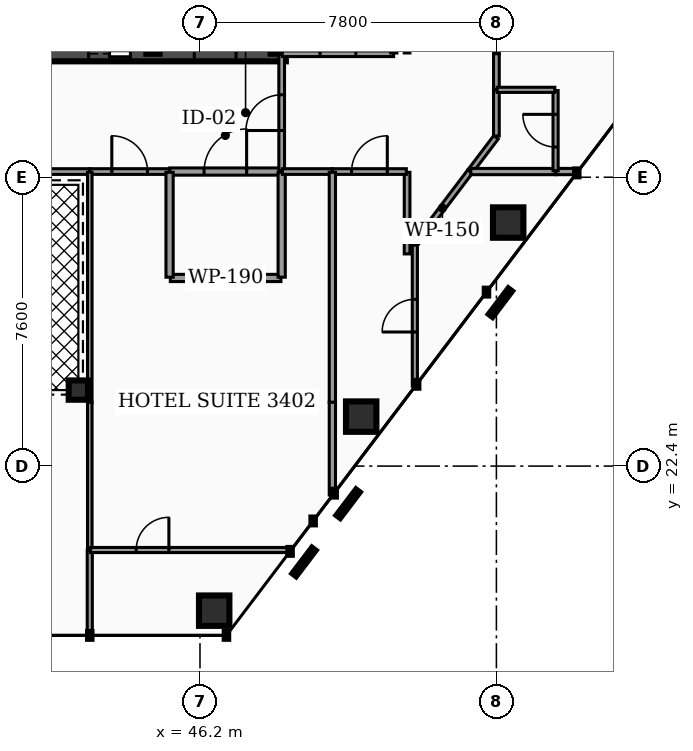
"""IFC4 building model, lengths in metres.
Left out: names, types, materials, properties, quantities, classifications, styles, units other than length and angle.
Written with IfcOpenShell. Run it as: python <this file> out.ifc"""

import sys

from ifc_helpers import new_model, si_unit, direction, frame, frame_2d, origin, origin_2d, place, context, subcontext, project, spatial, rectangle, hollow_rectangle, hollow_circle, extrude, element, fill, save


model = new_model("IFC4")
c1 = context("Model", 3, precision=1e-05, world=origin(), true_north=direction((0.0, 1.0)))
c2 = subcontext(c1, "Body", "Model", "MODEL_VIEW")
j1 = project(units=[si_unit("LENGTHUNIT", "METRE"), si_unit("PLANEANGLEUNIT", "RADIAN")], contexts=[c1])
p1 = place(None, origin())
s1 = spatial("IfcSite", under=j1, at=p1, CompositionType="ELEMENT")
p2 = place(p1, origin())
s2 = spatial("IfcBuilding", under=s1, at=p2, CompositionType="ELEMENT")
p3 = place(p2, frame((0.0, 0.0, 142.12)))
s3 = spatial("IfcBuildingStorey", under=s2, at=p3, CompositionType="ELEMENT", Elevation=142.12)
p4 = place(p3, frame((28.4, 33.25, 0.0), z_axis=(0.0, 0.0, 1.0), x_axis=(1.0, 0.0, 0.0)))
e1 = element("IfcWall", 1, at=p4, inside=s3, PredefinedType="SHEAR", context=c2, shape_type="SweptSolid", body=[
    extrude(rectangle(XDim=20.06, YDim=0.4, at=frame_2d((10.03, 0.0))), origin(), (0.0, 0.0, 1.0), 3.5),
])
p5 = place(p4, frame((4.03, 0.0, 0.0)))
e2 = element("IfcOpeningElement", 2, at=p5, cuts=e1, PredefinedType="OPENING", context=c2, shape_type="SweptSolid", body=[
    extrude(rectangle(XDim=1.1, YDim=2.15, at=frame_2d((0.55, 1.075))), frame((0.0, 0.21, 0.0), z_axis=(0.0, -1.0, 0.0), x_axis=(1.0, 0.0, 0.0)), (0.0, 0.0, 1.0), 0.42),
])
p6 = place(p4, frame((14.87, 0.0, 0.0)))
e3 = element("IfcOpeningElement", 3, at=p6, cuts=e1, PredefinedType="OPENING", context=c2, shape_type="SweptSolid", body=[
    extrude(rectangle(XDim=1.1, YDim=2.15, at=frame_2d((0.55, 1.075))), frame((0.0, 0.21, 0.0), z_axis=(0.0, -1.0, 0.0), x_axis=(1.0, 0.0, 0.0)), (0.0, 0.0, 1.0), 0.42),
])
p7 = place(p4, frame((5.95, 0.0, 0.0)))
e4 = element("IfcOpeningElement", 4, at=p7, cuts=e1, PredefinedType="OPENING", context=c2, shape_type="SweptSolid", body=[
    extrude(rectangle(XDim=1.0, YDim=2.1, at=frame_2d((0.5, 1.05))), frame((0.0, 0.21, 0.0), z_axis=(0.0, -1.0, 0.0), x_axis=(1.0, 0.0, 0.0)), (0.0, 0.0, 1.0), 0.42),
])
p8 = place(p4, frame((7.65, 0.0, 0.0)))
e5 = element("IfcOpeningElement", 5, at=p8, cuts=e1, PredefinedType="OPENING", context=c2, shape_type="SweptSolid", body=[
    extrude(rectangle(XDim=1.0, YDim=2.1, at=frame_2d((0.5, 1.05))), frame((0.0, 0.21, 0.0), z_axis=(0.0, -1.0, 0.0), x_axis=(1.0, 0.0, 0.0)), (0.0, 0.0, 1.0), 0.42),
])
p9 = place(p4, frame((1.31, 0.0, 0.0)))
e6 = element("IfcOpeningElement", 6, at=p9, cuts=e1, PredefinedType="OPENING", context=c2, shape_type="SweptSolid", body=[
    extrude(rectangle(XDim=1.1, YDim=2.2, at=frame_2d((0.55, 1.1))), frame((0.0, 0.21, 0.0), z_axis=(0.0, -1.0, 0.0), x_axis=(1.0, 0.0, 0.0)), (0.0, 0.0, 1.0), 0.42),
])
p10 = place(p4, frame((9.44, 0.0, 0.0)))
e7 = element("IfcOpeningElement", 7, at=p10, cuts=e1, PredefinedType="OPENING", context=c2, shape_type="SweptSolid", body=[
    extrude(rectangle(XDim=1.12, YDim=2.05, at=frame_2d((0.56, 1.025))), frame((0.0, 0.21, 0.0), z_axis=(0.0, -1.0, 0.0), x_axis=(1.0, 0.0, 0.0)), (0.0, 0.0, 1.0), 0.42),
])
p11 = place(p4, frame((17.65, 0.0, 0.0)))
e8 = element("IfcOpeningElement", 8, at=p11, cuts=e1, PredefinedType="OPENING", context=c2, shape_type="SweptSolid", body=[
    extrude(rectangle(XDim=1.1, YDim=2.2, at=frame_2d((0.55, 1.1))), frame((0.0, 0.21, 0.0), z_axis=(0.0, -1.0, 0.0), x_axis=(1.0, 0.0, 0.0)), (0.0, 0.0, 1.0), 0.42),
])
p12 = place(p3, frame((44.965, 33.25, 0.0), z_axis=(0.0, 0.0, 1.0), x_axis=(0.0, 1.0, 0.0)))
e9 = element("IfcWall", 9, at=p12, inside=s3, PredefinedType="SHEAR", context=c2, shape_type="SweptSolid", body=[
    extrude(rectangle(XDim=10.2, YDim=0.35, at=frame_2d((5.1, 0.0))), origin(), (0.0, 0.0, 1.0), 3.5),
])
p13 = place(p3, frame((48.26, 33.25, 0.0), z_axis=(0.0, 0.0, 1.0), x_axis=(0.0, 1.0, 0.0)))
e10 = element("IfcWall", 10, at=p13, inside=s3, PredefinedType="SHEAR", context=c2, shape_type="SweptSolid", body=[
    extrude(rectangle(XDim=10.2, YDim=0.4, at=frame_2d((5.1, 0.0))), origin(), (0.0, 0.0, 1.0), 3.5),
])
p14 = place(p3, frame((46.574, 18.596, 0.0), z_axis=(-0.089987082643, -0.032495335399, 0.995412667257), x_axis=(0.339644463778, -0.940553899692, 0.0)))
e11 = element("IfcColumn", 11, at=p14, inside=s3, PredefinedType="COLUMN", context=c2, shape_type="SweptSolid", body=[
    extrude(hollow_rectangle(XDim=0.8, YDim=0.8, WallThickness=0.04, at=origin_2d()), origin(), (0.0, 0.0, 1.0), 3.516),
])
p15 = place(p3, frame((50.442, 23.702, 0.0), z_axis=(-0.063140746521, 0.003132672099, 0.997999715678), x_axis=(-0.049553160901, -0.998771487501, 0.0)))
e12 = element("IfcColumn", 12, at=p15, inside=s3, PredefinedType="COLUMN", context=c2, shape_type="SweptSolid", body=[
    extrude(hollow_rectangle(XDim=0.8, YDim=0.8, WallThickness=0.04, at=origin_2d()), origin(), (0.0, 0.0, 1.0), 3.507),
])
p16 = place(p3, frame((54.31, 28.808, 0.0), z_axis=(-0.036081962312, 0.038868214228, 0.998592686694), x_axis=(-0.732887043216, -0.68035033761, 0.0)))
e13 = element("IfcColumn", 13, at=p16, inside=s3, PredefinedType="COLUMN", context=c2, shape_type="SweptSolid", body=[
    extrude(hollow_rectangle(XDim=0.8, YDim=0.8, WallThickness=0.04, at=origin_2d()), origin(), (0.0, 0.0, 1.0), 3.505),
])
p17 = place(p3, frame((43.0, 24.4, 0.0), z_axis=(0.0, 0.0, 1.0), x_axis=(1.0, 0.0, 0.0)))
e14 = element("IfcColumn", 14, at=p17, inside=s3, PredefinedType="COLUMN", context=c2, shape_type="SweptSolid", body=[
    extrude(hollow_circle(Radius=0.254, WallThickness=0.02, at=origin_2d()), origin(), (0.0, 0.0, 1.0), 3.5),
])
p18 = place(p3, frame((45.405, 30.15, 0.0), z_axis=(0.0, 0.0, 1.0), x_axis=(1.0, 0.0, 0.0)))
e15 = element("IfcWall", 15, at=p18, inside=s3, PredefinedType="PARTITIONING", context=c2, shape_type="SweptSolid", body=[
    extrude(rectangle(XDim=2.925, YDim=0.19, at=frame_2d((1.462, 0.0))), origin(), (0.0, 0.0, 1.0), 2.457),
])
p19 = place(p18, frame((0.903, 0.0, 0.0)))
e16 = element("IfcOpeningElement", 16, at=p19, cuts=e15, PredefinedType="OPENING", context=c2, shape_type="SweptSolid", body=[
    extrude(rectangle(XDim=1.12, YDim=2.05, at=frame_2d((0.56, 1.025))), frame((0.0, 0.105, 0.0), z_axis=(0.0, -1.0, 0.0), x_axis=(1.0, 0.0, 0.0)), (0.0, 0.0, 1.0), 0.21),
])
p20 = place(p3, frame((48.35, 30.17, 0.0), z_axis=(0.0, 0.0, 1.0), x_axis=(0.0, 1.0, 0.0)))
e17 = element("IfcWall", 17, at=p20, inside=s3, PredefinedType="PARTITIONING", context=c2, shape_type="SweptSolid", body=[
    extrude(rectangle(XDim=3.06, YDim=0.15, at=frame_2d((1.53, 0.0))), origin(), (0.0, 0.0, 1.0), 2.457),
])
p21 = place(p20, frame((1.06, 0.0, 0.0)))
e18 = element("IfcOpeningElement", 18, at=p21, cuts=e17, PredefinedType="OPENING", context=c2, shape_type="SweptSolid", body=[
    extrude(rectangle(XDim=0.94, YDim=2.05, at=frame_2d((0.47, 1.025))), frame((0.0, 0.085, 0.0), z_axis=(0.0, -1.0, 0.0), x_axis=(1.0, 0.0, 0.0)), (0.0, 0.0, 1.0), 0.17),
])
p22 = place(p3, frame((35.385, 30.15, 0.0), z_axis=(0.0, 0.0, 1.0), x_axis=(1.0, 0.0, 0.0)))
e19 = element("IfcWall", 19, at=p22, inside=s3, PredefinedType="PARTITIONING", context=c2, shape_type="SweptSolid", body=[
    extrude(rectangle(XDim=7.91, YDim=0.15, at=frame_2d((3.955, 0.0))), origin(), (0.0, 0.0, 1.0), 2.457),
])
p23 = place(p22, frame((0.25, 0.0, 0.0)))
e20 = element("IfcOpeningElement", 20, at=p23, cuts=e19, PredefinedType="OPENING", context=c2, shape_type="SweptSolid", body=[
    extrude(rectangle(XDim=0.88, YDim=2.05, at=frame_2d((0.44, 1.025))), frame((0.0, 0.085, 0.0), z_axis=(0.0, -1.0, 0.0), x_axis=(1.0, 0.0, 0.0)), (0.0, 0.0, 1.0), 0.17),
])
p24 = place(p3, frame((43.305, 30.15, 0.0), z_axis=(0.0, 0.0, 1.0), x_axis=(1.0, 0.0, 0.0)))
e21 = element("IfcWall", 21, at=p24, inside=s3, PredefinedType="PARTITIONING", context=c2, shape_type="SweptSolid", body=[
    extrude(rectangle(XDim=2.09, YDim=0.15, at=frame_2d((1.045, 0.0))), origin(), (0.0, 0.0, 1.0), 2.457),
])
p25 = place(p24, frame((0.575, 0.0, 0.0)))
e22 = element("IfcOpeningElement", 22, at=p25, cuts=e21, PredefinedType="OPENING", context=c2, shape_type="SweptSolid", body=[
    extrude(rectangle(XDim=0.94, YDim=2.05, at=frame_2d((0.47, 1.025))), frame((0.0, 0.085, 0.0), z_axis=(0.0, -1.0, 0.0), x_axis=(1.0, 0.0, 0.0)), (0.0, 0.0, 1.0), 0.17),
])
p26 = place(p3, frame((45.42, 27.35, 0.0), z_axis=(0.0, 0.0, 1.0), x_axis=(1.0, 0.0, 0.0)))
e23 = element("IfcWall", 23, at=p26, inside=s3, PredefinedType="PARTITIONING", context=c2, shape_type="SweptSolid", body=[
    extrude(rectangle(XDim=2.91, YDim=0.19, at=frame_2d((1.455, 0.0))), origin(), (0.0, 0.0, 1.0), 2.457),
])
for number, where, z_axis, x_axis in (
    (24, (45.4, 27.37, 0.0), (0.0, 0.0, 1.0), (0.0, 1.0, 0.0)),
    (25, (48.35, 27.37, 0.0), (0.0, 0.0, 1.0), (0.0, 1.0, 0.0)),
):
    element("IfcWall", number, at=place(p3, frame(where, z_axis=z_axis, x_axis=x_axis)), inside=s3, PredefinedType="PARTITIONING", context=c2, shape_type="SweptSolid", body=[
        extrude(rectangle(XDim=2.76, YDim=0.19, at=frame_2d((1.38, 0.0))), origin(), (0.0, 0.0, 1.0), 2.457),
    ])
p27 = place(p3, frame((48.37, 30.15, 0.0), z_axis=(0.0, 0.0, 1.0), x_axis=(1.0, 0.0, 0.0)))
e26 = element("IfcWall", 26, at=p27, inside=s3, PredefinedType="PARTITIONING", context=c2, shape_type="SweptSolid", body=[
    extrude(rectangle(XDim=1.309, YDim=0.15, at=frame_2d((0.654, 0.0))), origin(), (0.0, 0.0, 1.0), 2.457),
])
p28 = place(p3, frame((51.65, 27.982, 0.0), z_axis=(0.0, 0.0, 1.0), x_axis=(0.0, 1.0, 0.0)))
e27 = element("IfcWall", 27, at=p28, inside=s3, PredefinedType="PARTITIONING", context=c2, shape_type="SweptSolid", body=[
    extrude(rectangle(XDim=2.147, YDim=0.15, at=frame_2d((1.074, 0.0))), origin(), (0.0, 0.0, 1.0), 2.457),
])
p29 = place(p3, frame((49.689, 30.15, 0.0), z_axis=(0.0, 0.0, 1.0), x_axis=(1.0, 0.0, 0.0)))
e28 = element("IfcWall", 28, at=p29, inside=s3, PredefinedType="PARTITIONING", context=c2, shape_type="SweptSolid", body=[
    extrude(rectangle(XDim=1.941, YDim=0.15, at=frame_2d((0.971, 0.0))), origin(), (0.0, 0.0, 1.0), 2.457),
])
p30 = place(p29, frame((0.501, 0.0, 0.0)))
e29 = element("IfcOpeningElement", 29, at=p30, cuts=e28, PredefinedType="OPENING", context=c2, shape_type="SweptSolid", body=[
    extrude(rectangle(XDim=0.94, YDim=2.05, at=frame_2d((0.47, 1.025))), frame((0.0, 0.085, 0.0), z_axis=(0.0, -1.0, 0.0), x_axis=(1.0, 0.0, 0.0)), (0.0, 0.0, 1.0), 0.17),
])
p31 = place(p3, frame((51.851, 28.228, 0.0), z_axis=(0.0, 0.0, 1.0), x_axis=(0.60378553019, 0.797146808018, 0.0)))
e30 = element("IfcWall", 30, at=p31, inside=s3, PredefinedType="PARTITIONING", context=c2, shape_type="SweptSolid", body=[
    extrude(rectangle(XDim=2.41, YDim=0.15, at=frame_2d((1.205, 0.0))), origin(), (0.0, 0.0, 1.0), 2.457),
])
p32 = place(p3, frame((54.0, 33.25, 0.0), z_axis=(0.0, 0.0, 1.0), x_axis=(0.0, 1.0, 0.0)))
e31 = element("IfcWall", 31, at=p32, inside=s3, PredefinedType="PARTITIONING", context=c2, shape_type="SweptSolid", body=[
    extrude(rectangle(XDim=6.365, YDim=0.15, at=frame_2d((3.183, 0.0))), origin(), (0.0, 0.0, 1.0), 2.457),
])
p33 = place(p32, frame((2.712, 0.0, 0.0)))
e32 = element("IfcOpeningElement", 32, at=p33, cuts=e31, PredefinedType="OPENING", context=c2, shape_type="SweptSolid", body=[
    extrude(rectangle(XDim=0.94, YDim=2.05, at=frame_2d((0.47, 1.025))), frame((0.0, 0.085, 0.0), z_axis=(0.0, -1.0, 0.0), x_axis=(1.0, 0.0, 0.0)), (0.0, 0.0, 1.0), 0.17),
])
p34 = place(p3, frame((54.0, 32.305, 0.0), z_axis=(0.0, 0.0, 1.0), x_axis=(0.0, 1.0, 0.0)))
e33 = element("IfcWall", 33, at=p34, inside=s3, PredefinedType="PARTITIONING", context=c2, shape_type="SweptSolid", body=[
    extrude(rectangle(XDim=0.945, YDim=0.15, at=frame_2d((0.473, 0.0))), origin(), (0.0, 0.0, 1.0), 2.457),
])
p35 = place(p3, frame((54.0, 31.085, 0.0), z_axis=(0.0, 0.0, 1.0), x_axis=(0.0, 1.0, 0.0)))
e34 = element("IfcWall", 34, at=p35, inside=s3, PredefinedType="PARTITIONING", context=c2, shape_type="SweptSolid", body=[
    extrude(rectangle(XDim=1.21, YDim=0.15, at=frame_2d((0.605, 0.0))), origin(), (0.0, 0.0, 1.0), 2.457),
])
p36 = place(p3, frame((53.31, 30.154, 0.0), z_axis=(0.0, 0.0, 1.0), x_axis=(0.603752960425, 0.797171476395, 0.0)))
e35 = element("IfcWall", 35, at=p36, inside=s3, PredefinedType="PARTITIONING", context=c2, shape_type="SweptSolid", body=[
    extrude(rectangle(XDim=1.122, YDim=0.15, at=frame_2d((0.561, 0.0))), origin(), (0.0, 0.0, 1.0), 2.457),
])
p37 = place(p3, frame((51.65, 33.27, 0.0), z_axis=(0.0, 0.0, 1.0), x_axis=(0.0, 1.0, 0.0)))
e36 = element("IfcWall", 36, at=p37, inside=s3, PredefinedType="PARTITIONING", context=c2, shape_type="SweptSolid", body=[
    extrude(rectangle(XDim=9.21, YDim=0.15, at=frame_2d((4.605, 0.0))), origin(), (0.0, 0.0, 1.0), 2.457),
])
p38 = place(p3, frame((48.365, 33.25, 0.0), z_axis=(0.0, 0.0, 1.0), x_axis=(1.0, 0.0, 0.0)))
e37 = element("IfcWall", 37, at=p38, inside=s3, PredefinedType="PARTITIONING", context=c2, shape_type="SweptSolid", body=[
    extrude(rectangle(XDim=2.93, YDim=0.15, at=frame_2d((1.465, 0.0))), origin(), (0.0, 0.0, 1.0), 2.457),
])
p39 = place(p38, frame((0.995, 0.0, 0.0)))
e38 = element("IfcOpeningElement", 38, at=p39, cuts=e37, PredefinedType="OPENING", context=c2, shape_type="SweptSolid", body=[
    extrude(rectangle(XDim=0.94, YDim=2.05, at=frame_2d((0.47, 1.025))), frame((0.0, 0.085, 0.0), z_axis=(0.0, -1.0, 0.0), x_axis=(1.0, 0.0, 0.0)), (0.0, 0.0, 1.0), 0.17),
])
p40 = place(p3, frame((43.3, 24.078, 0.0), z_axis=(0.0, 0.0, 1.0), x_axis=(0.0, 1.0, 0.0)))
e39 = element("IfcWall", 39, at=p40, inside=s3, PredefinedType="PARTITIONING", context=c2, shape_type="SweptSolid", body=[
    extrude(rectangle(XDim=6.052, YDim=0.12, at=frame_2d((3.026, 0.0))), origin(), (0.0, 0.0, 1.0), 2.457),
])
p41 = place(p3, frame((43.3, 20.197, 0.0), z_axis=(0.0, 0.0, 1.0), x_axis=(0.0, 1.0, 0.0)))
e40 = element("IfcWall", 40, at=p41, inside=s3, PredefinedType="PARTITIONING", context=c2, shape_type="SweptSolid", body=[
    extrude(rectangle(XDim=3.881, YDim=0.12, at=frame_2d((1.94, 0.0))), origin(), (0.0, 0.0, 1.0), 2.457),
])
p42 = place(p3, frame((43.3, 17.961, 0.0), z_axis=(0.0, 0.0, 1.0), x_axis=(0.0, 1.0, 0.0)))
e41 = element("IfcWall", 41, at=p42, inside=s3, PredefinedType="PARTITIONING", context=c2, shape_type="SweptSolid", body=[
    extrude(rectangle(XDim=2.226, YDim=0.135, at=frame_2d((1.113, 0.0))), origin(), (0.0, 0.0, 1.0), 2.457),
])
p43 = place(p3, frame((43.32, 20.192, 0.0), z_axis=(0.0, 0.0, 1.0), x_axis=(1.0, 0.0, 0.0)))
e42 = element("IfcWall", 42, at=p43, inside=s3, PredefinedType="PARTITIONING", context=c2, shape_type="SweptSolid", body=[
    extrude(rectangle(XDim=5.263, YDim=0.135, at=frame_2d((2.632, 0.0))), origin(), (0.0, 0.0, 1.0), 2.457),
])
p44 = place(p43, frame((1.202, 0.0, 0.0)))
e43 = element("IfcOpeningElement", 43, at=p44, cuts=e42, PredefinedType="OPENING", context=c2, shape_type="SweptSolid", body=[
    extrude(rectangle(XDim=0.86, YDim=2.05, at=frame_2d((0.43, 1.025))), frame((0.0, 0.077, 0.0), z_axis=(0.0, -1.0, 0.0), x_axis=(1.0, 0.0, 0.0)), (0.0, 0.0, 1.0), 0.155),
])
p45 = place(p3, frame((49.684, 24.078, 0.0), z_axis=(0.0, 0.0, 1.0), x_axis=(0.0, 1.0, 0.0)))
e44 = element("IfcWall", 44, at=p45, inside=s3, PredefinedType="PARTITIONING", context=c2, shape_type="SweptSolid", body=[
    extrude(rectangle(XDim=6.052, YDim=0.165, at=frame_2d((3.026, 0.0))), origin(), (0.0, 0.0, 1.0), 2.457),
])
p46 = place(p3, frame((49.684, 21.639, 0.0), z_axis=(0.0, 0.0, 1.0), x_axis=(0.0, 1.0, 0.0)))
e45 = element("IfcWall", 45, at=p46, inside=s3, PredefinedType="PARTITIONING", context=c2, shape_type="SweptSolid", body=[
    extrude(rectangle(XDim=2.438, YDim=0.165, at=frame_2d((1.219, 0.0))), origin(), (0.0, 0.0, 1.0), 2.457),
])
p47 = place(p3, frame((51.854, 24.504, 0.0), z_axis=(0.0, 0.0, 1.0), x_axis=(0.0, 1.0, 0.0)))
e46 = element("IfcWall", 46, at=p47, inside=s3, PredefinedType="PARTITIONING", context=c2, shape_type="SweptSolid", body=[
    extrude(rectangle(XDim=3.708, YDim=0.135, at=frame_2d((1.854, 0.0))), origin(), (0.0, 0.0, 1.0), 2.457),
])
p48 = place(p47, frame((1.424, 0.0, 0.0)))
e47 = element("IfcOpeningElement", 47, at=p48, cuts=e46, PredefinedType="OPENING", context=c2, shape_type="SweptSolid", body=[
    extrude(rectangle(XDim=0.86, YDim=2.05, at=frame_2d((0.43, 1.025))), frame((0.0, 0.077, 0.0), z_axis=(0.0, -1.0, 0.0), x_axis=(1.0, 0.0, 0.0)), (0.0, 0.0, 1.0), 0.155),
])
p49 = place(p3, frame((55.562, 30.15, 0.0), z_axis=(0.0, 0.0, 1.0), x_axis=(1.0, 0.0, 0.0)))
e48 = element("IfcWall", 48, at=p49, inside=s3, PredefinedType="PARTITIONING", context=c2, shape_type="SweptSolid", body=[
    extrude(rectangle(XDim=0.565, YDim=0.165, at=frame_2d((0.283, 0.0))), origin(), (0.0, 0.0, 1.0), 2.457),
])
p50 = place(p3, frame((53.327, 30.15, 0.0), z_axis=(0.0, 0.0, 1.0), x_axis=(1.0, 0.0, 0.0)))
e49 = element("IfcWall", 49, at=p50, inside=s3, PredefinedType="PARTITIONING", context=c2, shape_type="SweptSolid", body=[
    extrude(rectangle(XDim=2.225, YDim=0.165, at=frame_2d((1.113, 0.0))), origin(), (0.0, 0.0, 1.0), 2.457),
])
p51 = place(p3, frame((55.557, 30.17, 0.0), z_axis=(0.0, 0.0, 1.0), x_axis=(0.0, 1.0, 0.0)))
e50 = element("IfcWall", 50, at=p51, inside=s3, PredefinedType="PARTITIONING", context=c2, shape_type="SweptSolid", body=[
    extrude(rectangle(XDim=2.11, YDim=0.135, at=frame_2d((1.055, 0.0))), origin(), (0.0, 0.0, 1.0), 2.457),
])
p52 = place(p51, frame((0.625, 0.0, 0.0)))
e51 = element("IfcOpeningElement", 51, at=p52, cuts=e50, PredefinedType="OPENING", context=c2, shape_type="SweptSolid", body=[
    extrude(rectangle(XDim=0.86, YDim=2.05, at=frame_2d((0.43, 1.025))), frame((0.0, 0.077, 0.0), z_axis=(0.0, -1.0, 0.0), x_axis=(1.0, 0.0, 0.0)), (0.0, 0.0, 1.0), 0.155),
])
p53 = place(p3, frame((54.02, 32.3, 0.0), z_axis=(0.0, 0.0, 1.0), x_axis=(1.0, 0.0, 0.0)))
e52 = element("IfcWall", 52, at=p53, inside=s3, PredefinedType="PARTITIONING", context=c2, shape_type="SweptSolid", body=[
    extrude(rectangle(XDim=1.517, YDim=0.135, at=frame_2d((0.759, 0.0))), origin(), (0.0, 0.0, 1.0), 2.457),
])
p54 = place(p3, frame((51.3, 33.27, 0.0), z_axis=(0.0, 0.0, 1.0), x_axis=(0.0, 1.0, 0.0)))
e53 = element("IfcWall", 53, at=p54, inside=s3, PredefinedType="PARTITIONING", context=c2, shape_type="SweptSolid", body=[
    extrude(rectangle(XDim=5.202, YDim=0.165, at=frame_2d((2.601, 0.0))), origin(), (0.0, 0.0, 1.0), 2.457),
])
p55 = place(p6, origin())
e54 = element("IfcDoor", 54, at=p55, inside=s3, OperationType="SLIDING_TO_RIGHT", PredefinedType="DOOR", context=c2, shape_type="SweptSolid", body=[
    extrude(rectangle(XDim=1.1, YDim=2.15, at=frame_2d((0.55, 1.075))), frame((0.0, 0.025, 0.0), z_axis=(0.0, -1.0, 0.0), x_axis=(1.0, 0.0, 0.0)), (0.0, 0.0, 1.0), 0.05),
])
fill(e3, e54)
p56 = place(p11, origin())
e55 = element("IfcDoor", 55, at=p56, inside=s3, OperationType="SINGLE_SWING_RIGHT", PredefinedType="DOOR", context=c2, shape_type="SweptSolid", body=[
    extrude(rectangle(XDim=1.1, YDim=2.2, at=frame_2d((0.55, 1.1))), frame((0.0, 0.025, 0.0), z_axis=(0.0, -1.0, 0.0), x_axis=(1.0, 0.0, 0.0)), (0.0, 0.0, 1.0), 0.05),
])
fill(e8, e55)
p57 = place(p19, origin())
e56 = element("IfcDoor", 56, at=p57, inside=s3, OperationType="SINGLE_SWING_RIGHT", PredefinedType="DOOR", context=c2, shape_type="SweptSolid", body=[
    extrude(rectangle(XDim=1.12, YDim=2.05, at=frame_2d((0.56, 1.025))), frame((0.0, 0.025, 0.0), z_axis=(0.0, -1.0, 0.0), x_axis=(1.0, 0.0, 0.0)), (0.0, 0.0, 1.0), 0.05),
])
fill(e16, e56)
p58 = place(p21, origin())
e57 = element("IfcDoor", 57, at=p58, inside=s3, OperationType="SINGLE_SWING_LEFT", PredefinedType="DOOR", context=c2, shape_type="SweptSolid", body=[
    extrude(rectangle(XDim=0.94, YDim=2.05, at=frame_2d((0.47, 1.025))), frame((0.0, 0.025, 0.0), z_axis=(0.0, -1.0, 0.0), x_axis=(1.0, 0.0, 0.0)), (0.0, 0.0, 1.0), 0.05),
])
fill(e18, e57)
p59 = place(p25, origin())
e58 = element("IfcDoor", 58, at=p59, inside=s3, OperationType="SINGLE_SWING_LEFT", PredefinedType="DOOR", context=c2, shape_type="SweptSolid", body=[
    extrude(rectangle(XDim=0.94, YDim=2.05, at=frame_2d((0.47, 1.025))), frame((0.0, 0.025, 0.0), z_axis=(0.0, -1.0, 0.0), x_axis=(1.0, 0.0, 0.0)), (0.0, 0.0, 1.0), 0.05),
])
fill(e22, e58)
p60 = place(p30, origin())
e59 = element("IfcDoor", 59, at=p60, inside=s3, OperationType="SINGLE_SWING_RIGHT", PredefinedType="DOOR", context=c2, shape_type="SweptSolid", body=[
    extrude(rectangle(XDim=0.94, YDim=2.05, at=frame_2d((0.47, 1.025))), frame((0.0, 0.025, 0.0), z_axis=(0.0, -1.0, 0.0), x_axis=(1.0, 0.0, 0.0)), (0.0, 0.0, 1.0), 0.05),
])
fill(e29, e59)
p61 = place(p39, origin())
e60 = element("IfcDoor", 60, at=p61, inside=s3, OperationType="SINGLE_SWING_LEFT", PredefinedType="DOOR", context=c2, shape_type="SweptSolid", body=[
    extrude(rectangle(XDim=0.94, YDim=2.05, at=frame_2d((0.47, 1.025))), frame((0.0, 0.025, 0.0), z_axis=(0.0, -1.0, 0.0), x_axis=(1.0, 0.0, 0.0)), (0.0, 0.0, 1.0), 0.05),
])
fill(e38, e60)
p62 = place(p44, origin())
e61 = element("IfcDoor", 61, at=p62, inside=s3, OperationType="SINGLE_SWING_RIGHT", PredefinedType="DOOR", context=c2, shape_type="SweptSolid", body=[
    extrude(rectangle(XDim=0.86, YDim=2.05, at=frame_2d((0.43, 1.025))), frame((0.0, 0.025, 0.0), z_axis=(0.0, -1.0, 0.0), x_axis=(1.0, 0.0, 0.0)), (0.0, 0.0, 1.0), 0.05),
])
fill(e43, e61)
p63 = place(p48, origin())
e62 = element("IfcDoor", 62, at=p63, inside=s3, OperationType="SINGLE_SWING_LEFT", PredefinedType="DOOR", context=c2, shape_type="SweptSolid", body=[
    extrude(rectangle(XDim=0.86, YDim=2.05, at=frame_2d((0.43, 1.025))), frame((0.0, 0.025, 0.0), z_axis=(0.0, -1.0, 0.0), x_axis=(1.0, 0.0, 0.0)), (0.0, 0.0, 1.0), 0.05),
])
fill(e47, e62)
p64 = place(p52, origin())
e63 = element("IfcDoor", 63, at=p64, inside=s3, OperationType="SINGLE_SWING_RIGHT", PredefinedType="DOOR", context=c2, shape_type="SweptSolid", body=[
    extrude(rectangle(XDim=0.86, YDim=2.05, at=frame_2d((0.43, 1.025))), frame((0.0, 0.025, 0.0), z_axis=(0.0, -1.0, 0.0), x_axis=(1.0, 0.0, 0.0)), (0.0, 0.0, 1.0), 0.05),
])
fill(e51, e63)
save(model, sys.argv[1])
